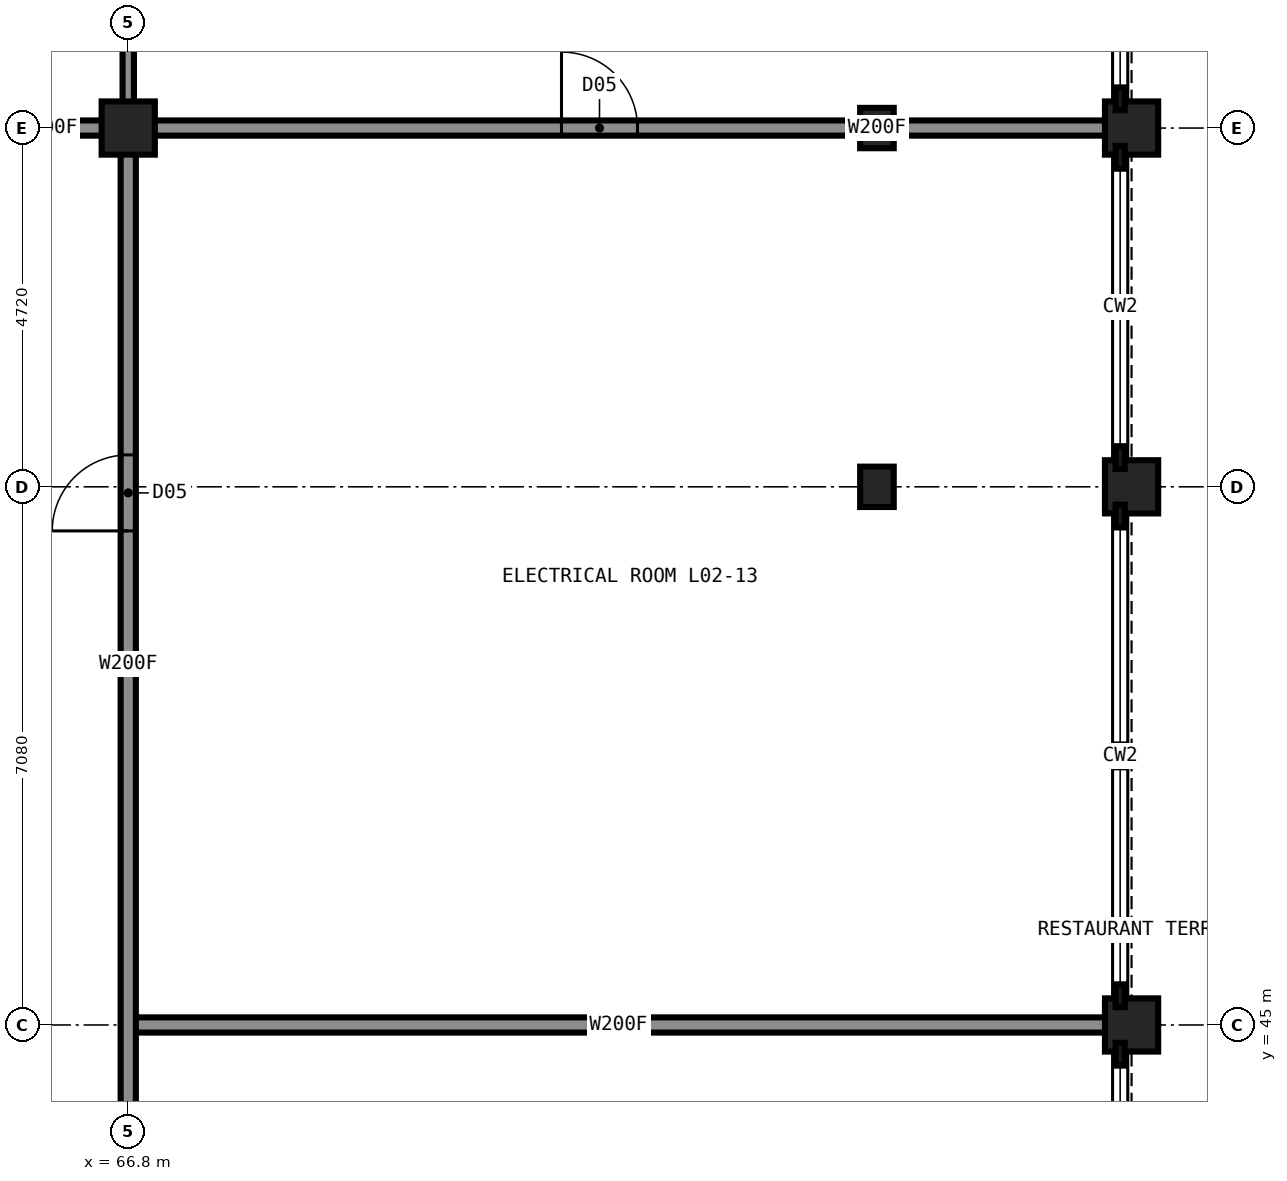
"""IFC4 building model, lengths in metres.
Left out: names, types, materials, properties, quantities, classifications, styles, units other than length and angle.
Written with IfcOpenShell. Run it as: python <this file> out.ifc"""

import sys

from ifc_helpers import new_model, si_unit, direction, frame, frame_2d, origin, origin_2d, place, context, subcontext, project, spatial, rectangle, hollow_rectangle, i_section, extrude, element, fill, save


model = new_model("IFC4")
c1 = context("Model", 3, precision=1e-05, world=origin(), true_north=direction((0.0, 1.0)))
c2 = subcontext(c1, "Body", "Model", "MODEL_VIEW")
j1 = project(units=[si_unit("LENGTHUNIT", "METRE"), si_unit("PLANEANGLEUNIT", "RADIAN")], contexts=[c1])
p1 = place(None, origin())
s1 = spatial("IfcSite", under=j1, at=p1, CompositionType="ELEMENT")
p2 = place(p1, origin())
s2 = spatial("IfcBuilding", under=s1, at=p2, CompositionType="ELEMENT")
p3 = place(p2, frame((0.0, 0.0, 11.0)))
s3 = spatial("IfcBuildingStorey", under=s2, at=p3, CompositionType="ELEMENT", Elevation=11.0)
for number, where, z_axis, x_axis in (
    (1, (76.65, 52.08, 0.0), (0.0, 0.0, 1.0), (1.0, 0.0, 0.0)),
    (2, (76.65, 56.8, 0.0), (0.0, 0.0, 1.0), (1.0, 0.0, 0.0)),
):
    element("IfcColumn", number, at=place(p3, frame(where, z_axis=z_axis, x_axis=x_axis)), inside=s3, PredefinedType="COLUMN", context=c2, shape_type="SweptSolid", body=[
        extrude(i_section(OverallWidth=0.442, OverallDepth=0.531, WebThickness=0.066, FlangeThickness=0.106, at=origin_2d()), origin(), (0.0, 0.0, 1.0), 5.0),
    ])
p4 = place(p3, frame((66.8, 56.8, 0.0), z_axis=(0.0, 0.0, 1.0), x_axis=(1.0, 0.0, 0.0)))
e3 = element("IfcColumn", 3, at=p4, inside=s3, PredefinedType="COLUMN", context=c2, shape_type="SweptSolid", body=[
    extrude(hollow_rectangle(XDim=0.7, YDim=0.7, WallThickness=0.06, at=origin_2d()), origin(), (0.0, 0.0, 1.0), 5.0),
])
for number, where, z_axis, x_axis in (
    (4, (80.0, 45.0, 0.0), (0.0, 0.0, 1.0), (1.0, 0.0, 0.0)),
    (5, (80.0, 52.08, 0.0), (0.0, 0.0, 1.0), (1.0, 0.0, 0.0)),
    (6, (80.0, 56.8, 0.0), (0.0, 0.0, 1.0), (1.0, 0.0, 0.0)),
):
    element("IfcColumn", number, at=place(p3, frame(where, z_axis=z_axis, x_axis=x_axis)), inside=s3, PredefinedType="COLUMN", context=c2, shape_type="SweptSolid", body=[
        extrude(rectangle(XDim=0.7, YDim=0.7, at=origin_2d()), origin(), (0.0, 0.0, 1.0), 5.0),
    ])
p5 = place(p3, frame((66.8, 45.0, 0.0), z_axis=(0.0, 0.0, 1.0), x_axis=(1.0, 0.0, 0.0)))
e7 = element("IfcWall", 7, at=p5, inside=s3, PredefinedType="PARTITIONING", context=c2, shape_type="SweptSolid", body=[
    extrude(rectangle(XDim=12.9, YDim=0.2, at=frame_2d((6.45, 0.0))), origin(), (0.0, 0.0, 1.0), 4.65),
])
p6 = place(p3, frame((64.7, 56.8, 0.0), z_axis=(0.0, 0.0, 1.0), x_axis=(1.0, 0.0, 0.0)))
e8 = element("IfcWall", 8, at=p6, inside=s3, PredefinedType="PARTITIONING", context=c2, shape_type="SweptSolid", body=[
    extrude(rectangle(XDim=2.1, YDim=0.2, at=frame_2d((1.05, 0.0))), origin(), (0.0, 0.0, 1.0), 4.65),
])
p7 = place(p3, frame((66.8, 56.8, 0.0), z_axis=(0.0, 0.0, 1.0), x_axis=(1.0, 0.0, 0.0)))
e9 = element("IfcWall", 9, at=p7, inside=s3, PredefinedType="PARTITIONING", context=c2, shape_type="SweptSolid", body=[
    extrude(rectangle(XDim=12.9, YDim=0.2, at=frame_2d((6.45, 0.0))), origin(), (0.0, 0.0, 1.0), 4.65),
])
p8 = place(p7, frame((5.7, 0.0, 0.0)))
e10 = element("IfcOpeningElement", 10, at=p8, cuts=e9, PredefinedType="OPENING", context=c2, shape_type="SweptSolid", body=[
    extrude(rectangle(XDim=1.0, YDim=2.1, at=frame_2d((0.5, 1.05))), frame((0.0, 0.11, 0.0), z_axis=(0.0, -1.0, 0.0), x_axis=(1.0, 0.0, 0.0)), (0.0, 0.0, 1.0), 0.22),
])
p9 = place(p3, frame((66.8, 42.7, 0.0), z_axis=(0.0, 0.0, 1.0), x_axis=(0.0, 1.0, 0.0)))
e11 = element("IfcWall", 11, at=p9, inside=s3, PredefinedType="PARTITIONING", context=c2, shape_type="SweptSolid", body=[
    extrude(rectangle(XDim=14.1, YDim=0.2, at=frame_2d((7.05, 0.0))), origin(), (0.0, 0.0, 1.0), 4.65),
])
p10 = place(p9, frame((8.8, 0.0, 0.0)))
e12 = element("IfcOpeningElement", 12, at=p10, cuts=e11, PredefinedType="OPENING", context=c2, shape_type="SweptSolid", body=[
    extrude(rectangle(XDim=1.0, YDim=2.1, at=frame_2d((0.5, 1.05))), frame((0.0, 0.11, 0.0), z_axis=(0.0, -1.0, 0.0), x_axis=(1.0, 0.0, 0.0)), (0.0, 0.0, 1.0), 0.22),
])
p11 = place(p3, frame((66.8, 56.8, 0.0), z_axis=(0.0, 0.0, 1.0), x_axis=(0.0, 1.0, 0.0)))
e13 = element("IfcWall", 13, at=p11, inside=s3, PredefinedType="PARTITIONING", context=c2, shape_type="SweptSolid", body=[
    extrude(rectangle(XDim=13.9, YDim=0.15, at=frame_2d((6.95, 0.0))), origin(), (0.0, 0.0, 1.0), 4.65),
])
p12 = place(p11, frame((6.6, 0.0, 0.0)))
e14 = element("IfcOpeningElement", 14, at=p12, cuts=e13, PredefinedType="OPENING", context=c2, shape_type="SweptSolid", body=[
    extrude(rectangle(XDim=1.2, YDim=2.2, at=frame_2d((0.6, 1.1))), frame((0.0, 0.085, 0.0), z_axis=(0.0, -1.0, 0.0), x_axis=(1.0, 0.0, 0.0)), (0.0, 0.0, 1.0), 0.17),
])
p13 = place(p8, origin())
e15 = element("IfcDoor", 15, at=p13, inside=s3, OperationType="SINGLE_SWING_LEFT", PredefinedType="DOOR", context=c2, shape_type="SweptSolid", body=[
    extrude(rectangle(XDim=1.0, YDim=2.1, at=frame_2d((0.5, 1.05))), frame((0.0, 0.025, 0.0), z_axis=(0.0, -1.0, 0.0), x_axis=(1.0, 0.0, 0.0)), (0.0, 0.0, 1.0), 0.05),
])
fill(e10, e15)
p14 = place(p10, origin())
e16 = element("IfcDoor", 16, at=p14, inside=s3, OperationType="SINGLE_SWING_LEFT", PredefinedType="DOOR", context=c2, shape_type="SweptSolid", body=[
    extrude(rectangle(XDim=1.0, YDim=2.1, at=frame_2d((0.5, 1.05))), frame((0.0, 0.025, 0.0), z_axis=(0.0, -1.0, 0.0), x_axis=(1.0, 0.0, 0.0)), (0.0, 0.0, 1.0), 0.05),
])
fill(e12, e16)
save(model, sys.argv[1])
